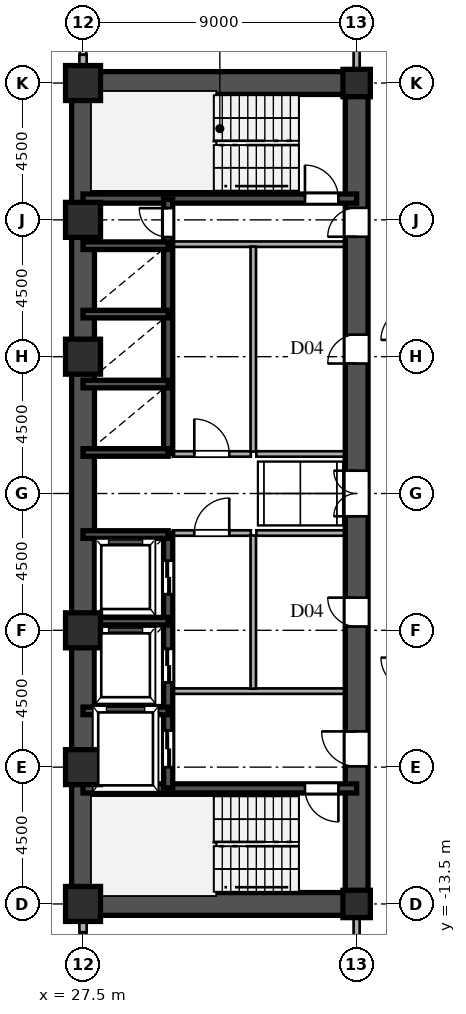
"""IFC4 building model, lengths in metres.
Left out: names, types, materials, properties, quantities, classifications, styles, units other than length and angle.
Written with IfcOpenShell. Run it as: python <this file> out.ifc"""

import sys

from ifc_helpers import new_model, si_unit, direction, frame, frame_2d, origin, origin_2d, place, context, subcontext, project, spatial, rectangle, hollow_rectangle, i_section, extrude, source, transform, mapped, element, fill, save


model = new_model("IFC4")
c1 = context("Model", 3, precision=1e-05, world=origin(), true_north=direction((0.0, 1.0)))
c2 = subcontext(c1, "Body", "Model", "MODEL_VIEW")
j1 = project(units=[si_unit("LENGTHUNIT", "METRE"), si_unit("PLANEANGLEUNIT", "RADIAN")], contexts=[c1])
p1 = place(None, origin())
s1 = spatial("IfcSite", under=j1, at=p1, CompositionType="ELEMENT")
p2 = place(p1, origin())
s2 = spatial("IfcBuilding", under=s1, at=p2, CompositionType="ELEMENT")
p3 = place(p2, frame((0.0, 0.0, 40.5)))
s3 = spatial("IfcBuildingStorey", under=s2, at=p3, CompositionType="ELEMENT", Elevation=40.5)
m1 = source(origin(), c2, "Body", "SweptSolid", [
    extrude(hollow_rectangle(XDim=1.15, YDim=1.15, WallThickness=0.048, at=origin_2d()), origin(), (0.0, 0.0, 1.0), 3.6),
])
for number, where, z_axis, x_axis in (
    (1, (27.5, -13.5, 0.0), (0.0, 0.0, 1.0), (1.0, 0.0, 0.0)),
    (2, (27.5, -9.0, 0.0), (0.0, 0.0, 1.0), (1.0, 0.0, 0.0)),
    (3, (27.5, -4.5, 0.0), (0.0, 0.0, 1.0), (1.0, 0.0, 0.0)),
    (4, (27.5, 4.5, 0.0), (0.0, 0.0, 1.0), (1.0, 0.0, 0.0)),
    (5, (27.5, 9.0, 0.0), (0.0, 0.0, 1.0), (1.0, 0.0, 0.0)),
    (6, (27.5, 13.5, 0.0), (0.0, 0.0, 1.0), (1.0, 0.0, 0.0)),
):
    element("IfcColumn", number, at=place(p3, frame(where, z_axis=z_axis, x_axis=x_axis)), inside=s3, PredefinedType="COLUMN", context=c2, shape_type="MappedRepresentation", body=[
        mapped(m1, transform((0.0, 0.0, 0.0), scale=1.0)),
    ])
m2 = source(origin(), c2, "Body", "SweptSolid", [
    extrude(i_section(OverallWidth=0.9, OverallDepth=0.9, WebThickness=0.036, FlangeThickness=0.055, at=origin_2d()), origin(), (0.0, 0.0, 1.0), 3.6),
])
for number, where, z_axis, x_axis in (
    (7, (36.5, -13.5, 0.0), (0.0, 0.0, 1.0), (1.0, 0.0, 0.0)),
    (8, (36.5, 13.5, 0.0), (0.0, 0.0, 1.0), (1.0, 0.0, 0.0)),
):
    element("IfcColumn", number, at=place(p3, frame(where, z_axis=z_axis, x_axis=x_axis)), inside=s3, PredefinedType="COLUMN", context=c2, shape_type="MappedRepresentation", body=[
        mapped(m2, transform((0.0, 0.0, 0.0), scale=1.0)),
    ])
for number, where, z_axis, x_axis in (
    (9, (27.5, -14.43, 0.0), (0.0, 0.0, 1.0), (0.0, 1.0, 0.0)),
    (10, (27.5, 13.88, 0.0), (0.0, 0.0, 1.0), (0.0, 1.0, 0.0)),
):
    element("IfcWall", number, at=place(p3, frame(where, z_axis=z_axis, x_axis=x_axis)), inside=s3, PredefinedType="SOLIDWALL", context=c2, shape_type="SweptSolid", body=[
        extrude(rectangle(XDim=0.55, YDim=0.24, at=frame_2d((0.275, 0.0))), origin(), (0.0, 0.0, 1.0), 2.88),
    ])
for number, where, z_axis, x_axis in (
    (11, (27.5, -13.5, 0.0), (0.0, 0.0, 1.0), (0.0, 1.0, 0.0)),
    (12, (27.5, 1.3, 0.0), (0.0, 0.0, 1.0), (0.0, 1.0, 0.0)),
):
    element("IfcWall", number, at=place(p3, frame(where, z_axis=z_axis, x_axis=x_axis)), inside=s3, PredefinedType="SHEAR", context=c2, shape_type="SweptSolid", body=[
        extrude(rectangle(XDim=12.2, YDim=0.75, at=frame_2d((6.1, 0.0))), origin(), (0.0, 0.0, 1.0), 3.38),
    ])
p4 = place(p3, frame((27.5, -1.3, 0.0), z_axis=(0.0, 0.0, 1.0), x_axis=(0.0, 1.0, 0.0)))
e13 = element("IfcWall", 13, at=p4, inside=s3, PredefinedType="SHEAR", context=c2, shape_type="SweptSolid", body=[
    extrude(rectangle(XDim=2.6, YDim=0.75, at=frame_2d((1.3, 0.0))), origin(), (0.0, 0.0, 1.0), 3.38),
])
for number, where, z_axis, x_axis in (
    (14, (27.5, -13.5, 0.0), (0.0, 0.0, 1.0), (1.0, 0.0, 0.0)),
    (15, (27.5, 13.5, 0.0), (0.0, 0.0, 1.0), (1.0, 0.0, 0.0)),
):
    element("IfcWall", number, at=place(p3, frame(where, z_axis=z_axis, x_axis=x_axis)), inside=s3, PredefinedType="SHEAR", context=c2, shape_type="SweptSolid", body=[
        extrude(rectangle(XDim=9.0, YDim=0.75, at=frame_2d((4.5, 0.0))), origin(), (0.0, 0.0, 1.0), 3.38),
    ])
p5 = place(p3, frame((36.5, -13.65, 0.0), z_axis=(0.0, 0.0, 1.0), x_axis=(0.0, 1.0, 0.0)))
e16 = element("IfcWall", 16, at=p5, inside=s3, PredefinedType="SHEAR", context=c2, shape_type="SweptSolid", body=[
    extrude(rectangle(XDim=7.15, YDim=0.75, at=frame_2d((3.575, 0.0))), origin(), (0.0, 0.0, 1.0), 3.38),
])
p6 = place(p5, frame((4.675, 0.0, 0.0)))
e17 = element("IfcOpeningElement", 17, at=p6, cuts=e16, PredefinedType="OPENING", context=c2, shape_type="SweptSolid", body=[
    extrude(rectangle(XDim=1.15, YDim=2.2, at=frame_2d((0.575, 1.1))), frame((0.0, 0.385, 0.0), z_axis=(0.0, -1.0, 0.0), x_axis=(1.0, 0.0, 0.0)), (0.0, 0.0, 1.0), 0.77),
])
p7 = place(p3, frame((36.5, -1.3, 0.0), z_axis=(0.0, 0.0, 1.0), x_axis=(0.0, 1.0, 0.0)))
e18 = element("IfcWall", 18, at=p7, inside=s3, PredefinedType="SHEAR", context=c2, shape_type="SweptSolid", body=[
    extrude(rectangle(XDim=2.6, YDim=0.75, at=frame_2d((1.3, 0.0))), origin(), (0.0, 0.0, 1.0), 3.38),
])
p8 = place(p7, frame((0.55, 0.0, 0.0)))
e19 = element("IfcOpeningElement", 19, at=p8, cuts=e18, PredefinedType="OPENING", context=c2, shape_type="SweptSolid", body=[
    extrude(rectangle(XDim=1.5, YDim=2.3, at=frame_2d((0.75, 1.15))), frame((0.0, 0.385, 0.0), z_axis=(0.0, -1.0, 0.0), x_axis=(1.0, 0.0, 0.0)), (0.0, 0.0, 1.0), 0.77),
])
p9 = place(p3, frame((36.5, 8.2, 0.0), z_axis=(0.0, 0.0, 1.0), x_axis=(0.0, 1.0, 0.0)))
e20 = element("IfcWall", 20, at=p9, inside=s3, PredefinedType="SHEAR", context=c2, shape_type="SweptSolid", body=[
    extrude(rectangle(XDim=5.45, YDim=0.75, at=frame_2d((2.725, 0.0))), origin(), (0.0, 0.0, 1.0), 3.38),
])
p10 = place(p9, frame((0.245, 0.0, 0.0)))
e21 = element("IfcOpeningElement", 21, at=p10, cuts=e20, PredefinedType="OPENING", context=c2, shape_type="SweptSolid", body=[
    extrude(rectangle(XDim=0.95, YDim=2.15, at=frame_2d((0.475, 1.075))), frame((0.0, 0.385, 0.0), z_axis=(0.0, -1.0, 0.0), x_axis=(1.0, 0.0, 0.0)), (0.0, 0.0, 1.0), 0.77),
])
p11 = place(p3, frame((36.5, -6.5, 0.0), z_axis=(0.0, 0.0, 1.0), x_axis=(0.0, 1.0, 0.0)))
e22 = element("IfcWall", 22, at=p11, inside=s3, PredefinedType="SHEAR", context=c2, shape_type="SweptSolid", body=[
    extrude(rectangle(XDim=5.2, YDim=0.75, at=frame_2d((2.6, 0.0))), origin(), (0.0, 0.0, 1.0), 3.38),
])
p12 = place(p11, frame((2.125, 0.0, 0.0)))
e23 = element("IfcOpeningElement", 23, at=p12, cuts=e22, PredefinedType="OPENING", context=c2, shape_type="SweptSolid", body=[
    extrude(rectangle(XDim=0.95, YDim=2.15, at=frame_2d((0.475, 1.075))), frame((0.0, 0.385, 0.0), z_axis=(0.0, -1.0, 0.0), x_axis=(1.0, 0.0, 0.0)), (0.0, 0.0, 1.0), 0.77),
])
p13 = place(p3, frame((36.5, 1.3, 0.0), z_axis=(0.0, 0.0, 1.0), x_axis=(0.0, 1.0, 0.0)))
e24 = element("IfcWall", 24, at=p13, inside=s3, PredefinedType="SHEAR", context=c2, shape_type="SweptSolid", body=[
    extrude(rectangle(XDim=6.9, YDim=0.75, at=frame_2d((3.45, 0.0))), origin(), (0.0, 0.0, 1.0), 3.38),
])
p14 = place(p13, frame((2.975, 0.0, 0.0)))
e25 = element("IfcOpeningElement", 25, at=p14, cuts=e24, PredefinedType="OPENING", context=c2, shape_type="SweptSolid", body=[
    extrude(rectangle(XDim=0.95, YDim=2.15, at=frame_2d((0.475, 1.075))), frame((0.0, 0.385, 0.0), z_axis=(0.0, -1.0, 0.0), x_axis=(1.0, 0.0, 0.0)), (0.0, 0.0, 1.0), 0.77),
])
p15 = place(p3, frame((27.5, -9.7, 0.0), z_axis=(0.0, 0.0, 1.0), x_axis=(1.0, 0.0, 0.0)))
e26 = element("IfcWall", 26, at=p15, inside=s3, PredefinedType="SHEAR", context=c2, shape_type="SweptSolid", body=[
    extrude(rectangle(XDim=9.0, YDim=0.3, at=frame_2d((4.5, 0.0))), origin(), (0.0, 0.0, 1.0), 3.38),
])
p16 = place(p15, frame((7.3, 0.0, 0.0)))
e27 = element("IfcOpeningElement", 27, at=p16, cuts=e26, PredefinedType="OPENING", context=c2, shape_type="SweptSolid", body=[
    extrude(rectangle(XDim=1.1, YDim=2.2, at=frame_2d((0.55, 1.1))), frame((0.0, 0.16, 0.0), z_axis=(0.0, -1.0, 0.0), x_axis=(1.0, 0.0, 0.0)), (0.0, 0.0, 1.0), 0.32),
])
p17 = place(p3, frame((27.5, 9.7, 0.0), z_axis=(0.0, 0.0, 1.0), x_axis=(1.0, 0.0, 0.0)))
e28 = element("IfcWall", 28, at=p17, inside=s3, PredefinedType="SHEAR", context=c2, shape_type="SweptSolid", body=[
    extrude(rectangle(XDim=9.0, YDim=0.3, at=frame_2d((4.5, 0.0))), origin(), (0.0, 0.0, 1.0), 3.38),
])
p18 = place(p17, frame((7.3, 0.0, 0.0)))
e29 = element("IfcOpeningElement", 29, at=p18, cuts=e28, PredefinedType="OPENING", context=c2, shape_type="SweptSolid", body=[
    extrude(rectangle(XDim=1.1, YDim=2.2, at=frame_2d((0.55, 1.1))), frame((0.0, 0.16, 0.0), z_axis=(0.0, -1.0, 0.0), x_axis=(1.0, 0.0, 0.0)), (0.0, 0.0, 1.0), 0.32),
])
for number, where, z_axis, x_axis in (
    (30, (27.5, -7.15, 0.0), (0.0, 0.0, 1.0), (1.0, 0.0, 0.0)),
    (31, (27.5, -4.2, 0.0), (0.0, 0.0, 1.0), (1.0, 0.0, 0.0)),
    (32, (27.5, -1.35, 0.0), (0.0, 0.0, 1.0), (1.0, 0.0, 0.0)),
    (33, (27.5, 1.35, 0.0), (0.0, 0.0, 1.0), (1.0, 0.0, 0.0)),
    (34, (27.5, 3.6, 0.0), (0.0, 0.0, 1.0), (1.0, 0.0, 0.0)),
    (35, (27.5, 5.9, 0.0), (0.0, 0.0, 1.0), (1.0, 0.0, 0.0)),
    (36, (27.5, 8.15, 0.0), (0.0, 0.0, 1.0), (1.0, 0.0, 0.0)),
):
    element("IfcWall", number, at=place(p3, frame(where, z_axis=z_axis, x_axis=x_axis)), inside=s3, PredefinedType="SHEAR", context=c2, shape_type="SweptSolid", body=[
        extrude(rectangle(XDim=2.8, YDim=0.25, at=frame_2d((1.4, 0.0))), origin(), (0.0, 0.0, 1.0), 3.38),
    ])
p19 = place(p3, frame((30.3, -9.68, 0.0), z_axis=(0.0, 0.0, 1.0), x_axis=(0.0, 1.0, 0.0)))
e37 = element("IfcWall", 37, at=p19, inside=s3, PredefinedType="SHEAR", context=c2, shape_type="SweptSolid", body=[
    extrude(rectangle(XDim=2.56, YDim=0.3, at=frame_2d((1.28, 0.0))), origin(), (0.0, 0.0, 1.0), 3.38),
])
p20 = place(p19, frame((0.68, 0.0, 0.0)))
e38 = element("IfcOpeningElement", 38, at=p20, cuts=e37, PredefinedType="OPENING", context=c2, shape_type="SweptSolid", body=[
    extrude(rectangle(XDim=1.2, YDim=2.25, at=frame_2d((0.6, 1.125))), frame((0.0, 0.16, 0.0), z_axis=(0.0, -1.0, 0.0), x_axis=(1.0, 0.0, 0.0)), (0.0, 0.0, 1.0), 0.32),
])
p21 = place(p3, frame((30.3, -7.12, 0.0), z_axis=(0.0, 0.0, 1.0), x_axis=(0.0, 1.0, 0.0)))
e39 = element("IfcWall", 39, at=p21, inside=s3, PredefinedType="SHEAR", context=c2, shape_type="SweptSolid", body=[
    extrude(rectangle(XDim=2.92, YDim=0.3, at=frame_2d((1.46, 0.0))), origin(), (0.0, 0.0, 1.0), 3.38),
])
p22 = place(p21, frame((0.91, 0.0, 0.0)))
e40 = element("IfcOpeningElement", 40, at=p22, cuts=e39, PredefinedType="OPENING", context=c2, shape_type="SweptSolid", body=[
    extrude(rectangle(XDim=1.1, YDim=2.2, at=frame_2d((0.55, 1.1))), frame((0.0, 0.16, 0.0), z_axis=(0.0, -1.0, 0.0), x_axis=(1.0, 0.0, 0.0)), (0.0, 0.0, 1.0), 0.32),
])
p23 = place(p3, frame((30.3, -4.2, 0.0), z_axis=(0.0, 0.0, 1.0), x_axis=(0.0, 1.0, 0.0)))
e41 = element("IfcWall", 41, at=p23, inside=s3, PredefinedType="SHEAR", context=c2, shape_type="SweptSolid", body=[
    extrude(rectangle(XDim=2.88, YDim=0.3, at=frame_2d((1.44, 0.0))), origin(), (0.0, 0.0, 1.0), 3.38),
])
p24 = place(p23, frame((0.89, 0.0, 0.0)))
e42 = element("IfcOpeningElement", 42, at=p24, cuts=e41, PredefinedType="OPENING", context=c2, shape_type="SweptSolid", body=[
    extrude(rectangle(XDim=1.1, YDim=2.2, at=frame_2d((0.55, 1.1))), frame((0.0, 0.16, 0.0), z_axis=(0.0, -1.0, 0.0), x_axis=(1.0, 0.0, 0.0)), (0.0, 0.0, 1.0), 0.32),
])
p25 = place(p3, frame((30.3, 1.32, 0.0), z_axis=(0.0, 0.0, 1.0), x_axis=(0.0, 1.0, 0.0)))
e43 = element("IfcWall", 43, at=p25, inside=s3, PredefinedType="SHEAR", context=c2, shape_type="SweptSolid", body=[
    extrude(rectangle(XDim=2.28, YDim=0.3, at=frame_2d((1.14, 0.0))), origin(), (0.0, 0.0, 1.0), 3.38),
])
p26 = place(p3, frame((30.3, 3.6, 0.0), z_axis=(0.0, 0.0, 1.0), x_axis=(0.0, 1.0, 0.0)))
e44 = element("IfcWall", 44, at=p26, inside=s3, PredefinedType="SHEAR", context=c2, shape_type="SweptSolid", body=[
    extrude(rectangle(XDim=2.3, YDim=0.3, at=frame_2d((1.15, 0.0))), origin(), (0.0, 0.0, 1.0), 3.38),
])
p27 = place(p3, frame((30.3, 5.9, 0.0), z_axis=(0.0, 0.0, 1.0), x_axis=(0.0, 1.0, 0.0)))
e45 = element("IfcWall", 45, at=p27, inside=s3, PredefinedType="SHEAR", context=c2, shape_type="SweptSolid", body=[
    extrude(rectangle(XDim=2.25, YDim=0.3, at=frame_2d((1.125, 0.0))), origin(), (0.0, 0.0, 1.0), 3.38),
])
p28 = place(p3, frame((30.3, 8.15, 0.0), z_axis=(0.0, 0.0, 1.0), x_axis=(0.0, 1.0, 0.0)))
e46 = element("IfcWall", 46, at=p28, inside=s3, PredefinedType="SHEAR", context=c2, shape_type="SweptSolid", body=[
    extrude(rectangle(XDim=1.53, YDim=0.3, at=frame_2d((0.765, 0.0))), origin(), (0.0, 0.0, 1.0), 3.38),
])
p29 = place(p28, frame((0.285, 0.0, 0.0)))
e47 = element("IfcOpeningElement", 47, at=p29, cuts=e46, PredefinedType="OPENING", context=c2, shape_type="SweptSolid", body=[
    extrude(rectangle(XDim=0.95, YDim=2.15, at=frame_2d((0.475, 1.075))), frame((0.0, 0.16, 0.0), z_axis=(0.0, -1.0, 0.0), x_axis=(1.0, 0.0, 0.0)), (0.0, 0.0, 1.0), 0.32),
])
for number, where, z_axis, x_axis in (
    (48, (30.45, -6.5, 0.0), (0.0, 0.0, 1.0), (1.0, 0.0, 0.0)),
    (49, (30.45, 8.2, 0.0), (0.0, 0.0, 1.0), (1.0, 0.0, 0.0)),
):
    element("IfcWall", number, at=place(p3, frame(where, z_axis=z_axis, x_axis=x_axis)), inside=s3, PredefinedType="PARTITIONING", context=c2, shape_type="SweptSolid", body=[
        extrude(rectangle(XDim=5.7, YDim=0.18, at=frame_2d((2.85, 0.0))), origin(), (0.0, 0.0, 1.0), 3.38),
    ])
p30 = place(p3, frame((33.1, -6.42, 0.0), z_axis=(0.0, 0.0, 1.0), x_axis=(0.0, 1.0, 0.0)))
e50 = element("IfcWall", 50, at=p30, inside=s3, PredefinedType="PARTITIONING", context=c2, shape_type="SweptSolid", body=[
    extrude(rectangle(XDim=5.04, YDim=0.18, at=frame_2d((2.52, 0.0))), origin(), (0.0, 0.0, 1.0), 3.38),
])
p31 = place(p3, frame((33.1, 1.38, 0.0), z_axis=(0.0, 0.0, 1.0), x_axis=(0.0, 1.0, 0.0)))
e51 = element("IfcWall", 51, at=p31, inside=s3, PredefinedType="PARTITIONING", context=c2, shape_type="SweptSolid", body=[
    extrude(rectangle(XDim=6.74, YDim=0.18, at=frame_2d((3.37, 0.0))), origin(), (0.0, 0.0, 1.0), 3.38),
])
p32 = place(p3, frame((30.45, -1.3, 0.0), z_axis=(0.0, 0.0, 1.0), x_axis=(1.0, 0.0, 0.0)))
e52 = element("IfcWall", 52, at=p32, inside=s3, PredefinedType="PARTITIONING", context=c2, shape_type="SweptSolid", body=[
    extrude(rectangle(XDim=2.57, YDim=0.18, at=frame_2d((1.285, 0.0))), origin(), (0.0, 0.0, 1.0), 3.38),
])
p33 = place(p32, frame((0.71, 0.0, 0.0)))
e53 = element("IfcOpeningElement", 53, at=p33, cuts=e52, PredefinedType="OPENING", context=c2, shape_type="SweptSolid", body=[
    extrude(rectangle(XDim=1.15, YDim=2.2, at=frame_2d((0.575, 1.1))), frame((0.0, 0.1, 0.0), z_axis=(0.0, -1.0, 0.0), x_axis=(1.0, 0.0, 0.0)), (0.0, 0.0, 1.0), 0.2),
])
p34 = place(p3, frame((30.45, 1.3, 0.0), z_axis=(0.0, 0.0, 1.0), x_axis=(1.0, 0.0, 0.0)))
e54 = element("IfcWall", 54, at=p34, inside=s3, PredefinedType="PARTITIONING", context=c2, shape_type="SweptSolid", body=[
    extrude(rectangle(XDim=2.57, YDim=0.18, at=frame_2d((1.285, 0.0))), origin(), (0.0, 0.0, 1.0), 3.38),
])
p35 = place(p34, frame((0.71, 0.0, 0.0)))
e55 = element("IfcOpeningElement", 55, at=p35, cuts=e54, PredefinedType="OPENING", context=c2, shape_type="SweptSolid", body=[
    extrude(rectangle(XDim=1.15, YDim=2.2, at=frame_2d((0.575, 1.1))), frame((0.0, 0.1, 0.0), z_axis=(0.0, -1.0, 0.0), x_axis=(1.0, 0.0, 0.0)), (0.0, 0.0, 1.0), 0.2),
])
for number, where, z_axis, x_axis in (
    (56, (33.2, -1.3, 0.0), (0.0, 0.0, 1.0), (1.0, 0.0, 0.0)),
    (57, (33.2, 1.3, 0.0), (0.0, 0.0, 1.0), (1.0, 0.0, 0.0)),
):
    element("IfcWall", number, at=place(p3, frame(where, z_axis=z_axis, x_axis=x_axis)), inside=s3, PredefinedType="PARTITIONING", context=c2, shape_type="SweptSolid", body=[
        extrude(rectangle(XDim=2.95, YDim=0.18, at=frame_2d((1.475, 0.0))), origin(), (0.0, 0.0, 1.0), 3.38),
    ])
for number, where, z_axis, x_axis in (
    (58, (36.5, -15.515, 0.0), (0.0, 0.0, 1.0), (0.0, 1.0, 0.0)),
    (59, (36.5, 13.88, 0.0), (0.0, 0.0, 1.0), (0.0, 1.0, 0.0)),
):
    element("IfcWall", number, at=place(p3, frame(where, z_axis=z_axis, x_axis=x_axis)), inside=s3, PredefinedType="PARTITIONING", context=c2, shape_type="SweptSolid", body=[
        extrude(rectangle(XDim=1.635, YDim=0.2, at=frame_2d((0.817, 0.0))), origin(), (0.0, 0.0, 1.0), 2.68),
    ])
m3 = source(origin(), c2, "Body", "SweptSolid", [
    extrude(rectangle(XDim=1.15, YDim=2.2, at=frame_2d((0.575, 1.1))), frame((0.0, 0.025, 0.0), z_axis=(0.0, -1.0, 0.0), x_axis=(1.0, 0.0, 0.0)), (0.0, 0.0, 1.0), 0.05),
])
p36 = place(p6, origin())
e60 = element("IfcDoor", 60, at=p36, inside=s3, OperationType="SINGLE_SWING_RIGHT", PredefinedType="DOOR", context=c2, shape_type="MappedRepresentation", body=[
    mapped(m3, transform((0.0, 0.0, 0.0), scale=1.0)),
])
fill(e17, e60)
m4 = source(origin(), c2, "Body", "SweptSolid", [
    extrude(rectangle(XDim=1.5, YDim=2.3, at=frame_2d((0.75, 1.15))), frame((0.0, 0.025, 0.0), z_axis=(0.0, -1.0, 0.0), x_axis=(1.0, 0.0, 0.0)), (0.0, 0.0, 1.0), 0.05),
])
p37 = place(p8, origin())
e61 = element("IfcDoor", 61, at=p37, inside=s3, OperationType="DOUBLE_SWING_LEFT", PredefinedType="DOOR", context=c2, shape_type="MappedRepresentation", body=[
    mapped(m4, transform((0.0, 0.0, 0.0), scale=1.0)),
])
fill(e19, e61)
m5 = source(origin(), c2, "Body", "SweptSolid", [
    extrude(rectangle(XDim=0.95, YDim=2.15, at=frame_2d((0.475, 1.075))), frame((0.0, 0.025, 0.0), z_axis=(0.0, -1.0, 0.0), x_axis=(1.0, 0.0, 0.0)), (0.0, 0.0, 1.0), 0.05),
])
p38 = place(p10, origin())
e62 = element("IfcDoor", 62, at=p38, inside=s3, OperationType="SINGLE_SWING_LEFT", PredefinedType="DOOR", context=c2, shape_type="MappedRepresentation", body=[
    mapped(m5, transform((0.0, 0.0, 0.0), scale=1.0)),
])
fill(e21, e62)
p39 = place(p12, origin())
e63 = element("IfcDoor", 63, at=p39, inside=s3, OperationType="SINGLE_SWING_RIGHT", PredefinedType="DOOR", context=c2, shape_type="MappedRepresentation", body=[
    mapped(m5, transform((0.0, 0.0, 0.0), scale=1.0)),
])
fill(e23, e63)
p40 = place(p14, origin())
e64 = element("IfcDoor", 64, at=p40, inside=s3, OperationType="SINGLE_SWING_LEFT", PredefinedType="DOOR", context=c2, shape_type="MappedRepresentation", body=[
    mapped(m5, transform((0.0, 0.0, 0.0), scale=1.0)),
])
fill(e25, e64)
m6 = source(origin(), c2, "Body", "SweptSolid", [
    extrude(rectangle(XDim=1.1, YDim=2.2, at=frame_2d((0.55, 1.1))), frame((0.0, 0.025, 0.0), z_axis=(0.0, -1.0, 0.0), x_axis=(1.0, 0.0, 0.0)), (0.0, 0.0, 1.0), 0.05),
])
p41 = place(p16, frame((1.1, 0.0, 0.0), z_axis=(0.0, 0.0, 1.0), x_axis=(-1.0, 0.0, 0.0)))
e65 = element("IfcDoor", 65, at=p41, inside=s3, OperationType="SINGLE_SWING_RIGHT", PredefinedType="DOOR", context=c2, shape_type="MappedRepresentation", body=[
    mapped(m6, transform((0.0, 0.0, 0.0), scale=1.0)),
])
fill(e27, e65)
p42 = place(p18, origin())
e66 = element("IfcDoor", 66, at=p42, inside=s3, OperationType="SINGLE_SWING_LEFT", PredefinedType="DOOR", context=c2, shape_type="MappedRepresentation", body=[
    mapped(m6, transform((0.0, 0.0, 0.0), scale=1.0)),
])
fill(e29, e66)
m7 = source(origin(), c2, "Body", "SweptSolid", [
    extrude(rectangle(XDim=1.2, YDim=2.25, at=frame_2d((0.6, 1.125))), frame((0.0, 0.025, 0.0), z_axis=(0.0, -1.0, 0.0), x_axis=(1.0, 0.0, 0.0)), (0.0, 0.0, 1.0), 0.05),
])
p43 = place(p20, origin())
e67 = element("IfcDoor", 67, at=p43, inside=s3, OperationType="DOUBLE_DOOR_SLIDING", PredefinedType="DOOR", context=c2, shape_type="MappedRepresentation", body=[
    mapped(m7, transform((0.0, 0.0, 0.0), scale=1.0)),
])
fill(e38, e67)
m8 = source(origin(), c2, "Body", "SweptSolid", [
    extrude(rectangle(XDim=1.1, YDim=2.2, at=frame_2d((0.55, 1.1))), frame((0.0, 0.025, 0.0), z_axis=(0.0, -1.0, 0.0), x_axis=(1.0, 0.0, 0.0)), (0.0, 0.0, 1.0), 0.05),
])
p44 = place(p22, origin())
e68 = element("IfcDoor", 68, at=p44, inside=s3, OperationType="DOUBLE_DOOR_SLIDING", PredefinedType="DOOR", context=c2, shape_type="MappedRepresentation", body=[
    mapped(m8, transform((0.0, 0.0, 0.0), scale=1.0)),
])
fill(e40, e68)
p45 = place(p24, origin())
e69 = element("IfcDoor", 69, at=p45, inside=s3, OperationType="DOUBLE_DOOR_SLIDING", PredefinedType="DOOR", context=c2, shape_type="MappedRepresentation", body=[
    mapped(m8, transform((0.0, 0.0, 0.0), scale=1.0)),
])
fill(e42, e69)
p46 = place(p29, origin())
e70 = element("IfcDoor", 70, at=p46, inside=s3, OperationType="SINGLE_SWING_RIGHT", PredefinedType="DOOR", context=c2, shape_type="MappedRepresentation", body=[
    mapped(m5, transform((0.0, 0.0, 0.0), scale=1.0)),
])
fill(e47, e70)
p47 = place(p33, origin())
e71 = element("IfcDoor", 71, at=p47, inside=s3, OperationType="SINGLE_SWING_RIGHT", PredefinedType="DOOR", context=c2, shape_type="MappedRepresentation", body=[
    mapped(m3, transform((0.0, 0.0, 0.0), scale=1.0)),
])
fill(e53, e71)
p48 = place(p35, origin())
e72 = element("IfcDoor", 72, at=p48, inside=s3, OperationType="SINGLE_SWING_LEFT", PredefinedType="DOOR", context=c2, shape_type="MappedRepresentation", body=[
    mapped(m3, transform((0.0, 0.0, 0.0), scale=1.0)),
])
fill(e55, e72)
save(model, sys.argv[1])
